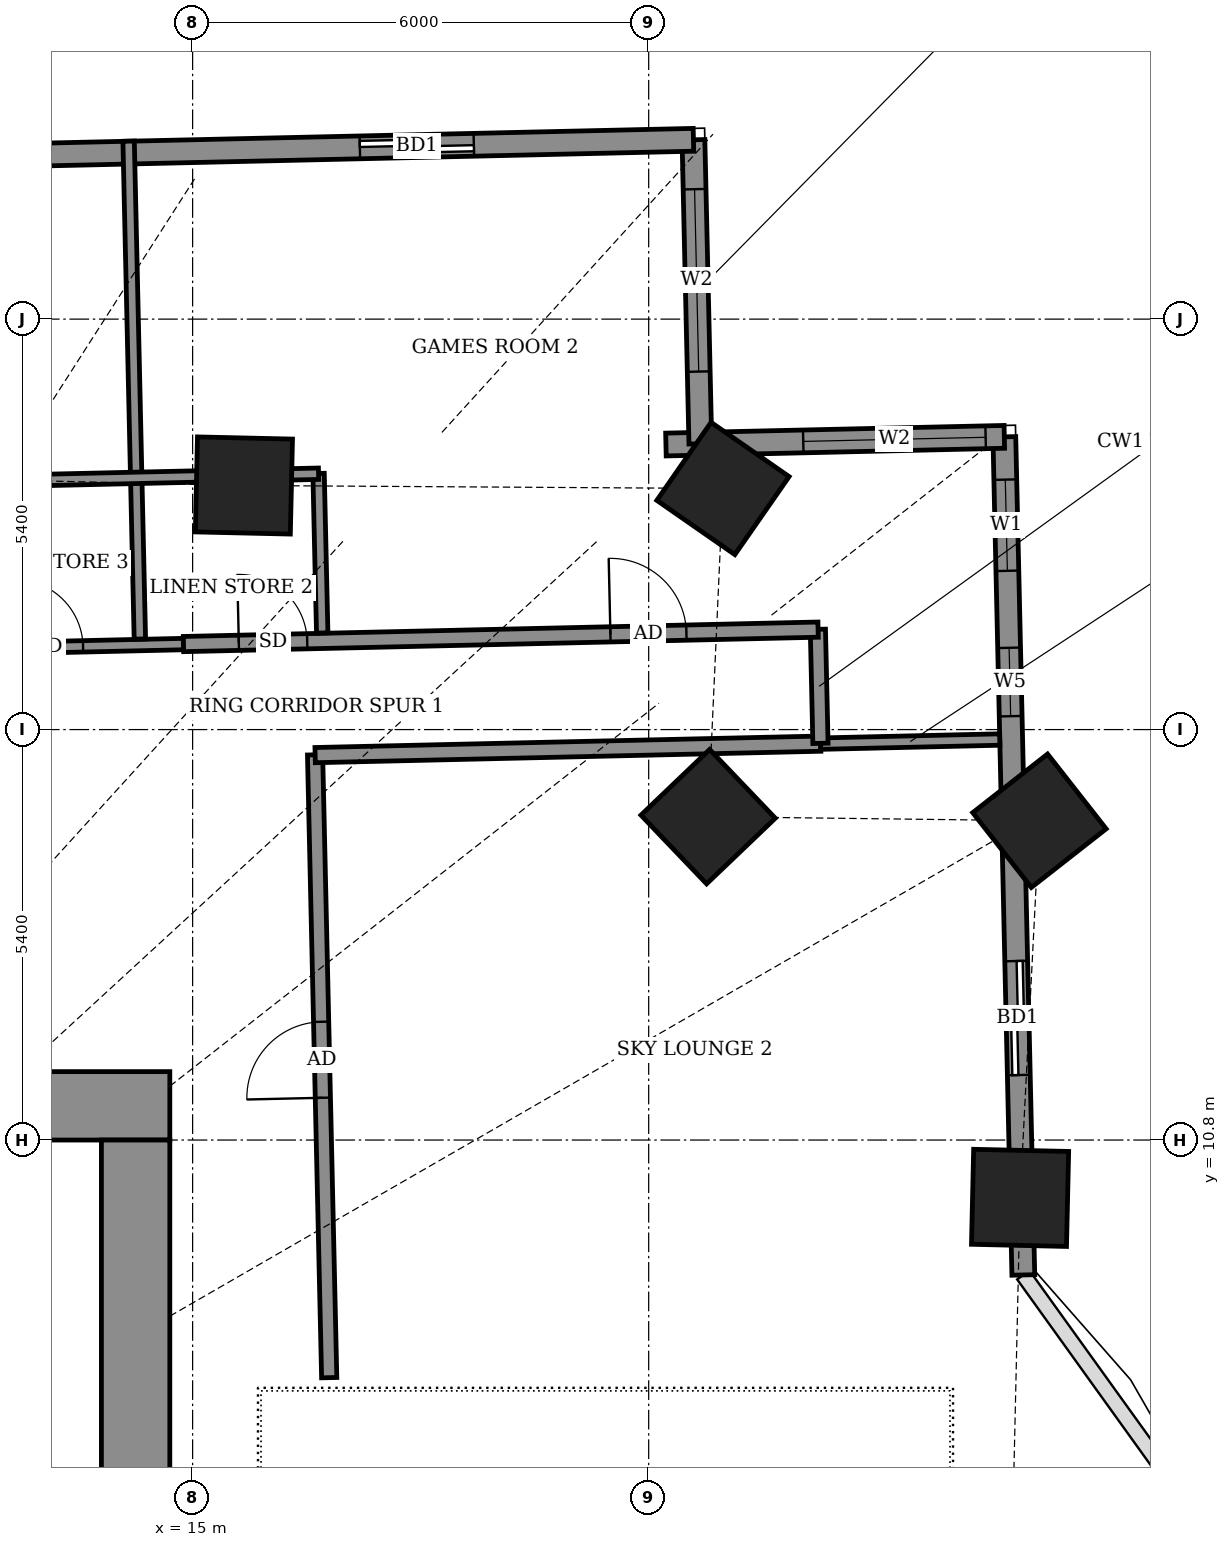
"""IFC4 building model, lengths in metres.
Left out: names, types, materials, properties, quantities, classifications, styles, units other than length and angle.
Written with IfcOpenShell. Run it as: python <this file> out.ifc"""

import sys

from ifc_helpers import new_model, si_unit, direction, frame, frame_2d, origin, origin_2d, place, context, subcontext, project, spatial, rectangle, extrude, element, fill, save


model = new_model("IFC4")
c1 = context("Model", 3, precision=1e-05, world=origin(), true_north=direction((0.0, 1.0)))
c2 = subcontext(c1, "Body", "Model", "MODEL_VIEW")
j1 = project(units=[si_unit("LENGTHUNIT", "METRE"), si_unit("PLANEANGLEUNIT", "RADIAN")], contexts=[c1])
p1 = place(None, origin())
s1 = spatial("IfcSite", under=j1, at=p1, CompositionType="ELEMENT")
p2 = place(p1, origin())
s2 = spatial("IfcBuilding", under=s1, at=p2, CompositionType="ELEMENT")
p3 = place(p2, frame((0.0, 0.0, 170.7)))
s3 = spatial("IfcBuildingStorey", under=s2, at=p3, CompositionType="ELEMENT", Elevation=170.7)
for number, where, z_axis, x_axis in (
    (1, (25.886, 10.039, -0.55), (0.0, 0.0, 1.0), (0.023, 1.0, 0.0)),
    (2, (26.141, 15.001, -0.55), (0.0, 0.0, 1.0), (-0.617, 0.787, 0.0)),
    (3, (21.782, 15.054, -0.55), (0.0, 0.0, 1.0), (-0.691, 0.723, 0.0)),
    (4, (21.977, 19.372, -0.55), (0.0, 0.0, 1.0), (-0.821, 0.571, 0.0)),
    (5, (15.675, 19.411, -0.55), (0.0, 0.0, 1.0), (-1.0, 0.023, 0.0)),
):
    element("IfcColumn", number, at=place(p3, frame(where, z_axis=z_axis, x_axis=x_axis)), inside=s3, PredefinedType="COLUMN", context=c2, shape_type="SweptSolid", body=[
        extrude(rectangle(XDim=1.25, YDim=1.25, at=origin_2d()), origin(), (0.0, 0.0, 1.0), 4.6),
    ])
p4 = place(p3, frame((25.929, 9.025, 0.0), z_axis=(0.0, 0.0, 1.0), x_axis=(-0.022667601583, 0.999743056909, 0.0)))
e6 = element("IfcWall", 6, at=p4, inside=s3, PredefinedType="SOLIDWALL", context=c2, shape_type="SweptSolid", body=[
    extrude(rectangle(XDim=11.029, YDim=0.3, at=frame_2d((5.515, 0.0))), origin(), (0.0, 0.0, 1.0), 2.65),
])
p5 = place(p4, frame((2.631, 0.0, 0.0)))
e7 = element("IfcOpeningElement", 7, at=p5, cuts=e6, PredefinedType="OPENING", context=c2, shape_type="SweptSolid", body=[
    extrude(rectangle(XDim=1.5, YDim=2.4, at=frame_2d((0.75, 1.2))), frame((0.0, 0.16, 0.0), z_axis=(0.0, -1.0, 0.0), x_axis=(1.0, 0.0, 0.0)), (0.0, 0.0, 1.0), 0.32),
])
p6 = place(p4, frame((7.353, 0.0, 0.9)))
e8 = element("IfcOpeningElement", 8, at=p6, cuts=e6, PredefinedType="OPENING", context=c2, shape_type="SweptSolid", body=[
    extrude(rectangle(XDim=0.9, YDim=1.5, at=frame_2d((0.45, 0.75))), frame((0.0, 0.16, 0.0), z_axis=(0.0, -1.0, 0.0), x_axis=(1.0, 0.0, 0.0)), (0.0, 0.0, 1.0), 0.32),
])
p7 = place(p4, frame((9.266, 0.0, 0.9)))
e9 = element("IfcOpeningElement", 9, at=p7, cuts=e6, PredefinedType="OPENING", context=c2, shape_type="SweptSolid", body=[
    extrude(rectangle(XDim=1.2, YDim=1.5, at=frame_2d((0.6, 0.75))), frame((0.0, 0.16, 0.0), z_axis=(0.0, -1.0, 0.0), x_axis=(1.0, 0.0, 0.0)), (0.0, 0.0, 1.0), 0.32),
])
p8 = place(p3, frame((25.679, 20.051, 0.0), z_axis=(0.0, 0.0, 1.0), x_axis=(-0.999742373047, -0.022697742936, 0.0)))
e10 = element("IfcWall", 10, at=p8, inside=s3, PredefinedType="SOLIDWALL", context=c2, shape_type="SweptSolid", body=[
    extrude(rectangle(XDim=4.453, YDim=0.3, at=frame_2d((2.227, 0.0))), origin(), (0.0, 0.0, 1.0), 2.85),
])
p9 = place(p8, frame((0.246, 0.0, 0.9)))
e11 = element("IfcOpeningElement", 11, at=p9, cuts=e10, PredefinedType="OPENING", context=c2, shape_type="SweptSolid", body=[
    extrude(rectangle(XDim=2.4, YDim=1.5, at=frame_2d((1.2, 0.75))), frame((0.0, 0.16, 0.0), z_axis=(0.0, -1.0, 0.0), x_axis=(1.0, 0.0, 0.0)), (0.0, 0.0, 1.0), 0.32),
])
p10 = place(p3, frame((21.68, 19.96, 0.0), z_axis=(0.0, 0.0, 1.0), x_axis=(-0.022704768219, 0.999742213523, 0.0)))
e12 = element("IfcWall", 12, at=p10, inside=s3, PredefinedType="SOLIDWALL", context=c2, shape_type="SweptSolid", body=[
    extrude(rectangle(XDim=4.0, YDim=0.3, at=frame_2d((2.0, 0.0))), origin(), (0.0, 0.0, 1.0), 2.85),
])
p11 = place(p10, frame((0.95, 0.0, 0.9)))
e13 = element("IfcOpeningElement", 13, at=p11, cuts=e12, PredefinedType="OPENING", context=c2, shape_type="SweptSolid", body=[
    extrude(rectangle(XDim=2.4, YDim=1.5, at=frame_2d((1.2, 0.75))), frame((0.0, 0.16, 0.0), z_axis=(0.0, -1.0, 0.0), x_axis=(1.0, 0.0, 0.0)), (0.0, 0.0, 1.0), 0.32),
])
p12 = place(p3, frame((21.589, 23.959, 0.0), z_axis=(0.0, 0.0, 1.0), x_axis=(-0.999742671382, -0.022684598702, 0.0)))
e14 = element("IfcWall", 14, at=p12, inside=s3, PredefinedType="SOLIDWALL", context=c2, shape_type="SweptSolid", body=[
    extrude(rectangle(XDim=40.381, YDim=0.3, at=frame_2d((20.19, 0.0))), origin(), (0.0, 0.0, 1.0), 2.85),
])
p13 = place(p12, frame((2.89, 0.0, 0.0)))
e15 = element("IfcOpeningElement", 15, at=p13, cuts=e14, PredefinedType="OPENING", context=c2, shape_type="SweptSolid", body=[
    extrude(rectangle(XDim=1.5, YDim=2.4, at=frame_2d((0.75, 1.2))), frame((0.0, 0.16, 0.0), z_axis=(0.0, -1.0, 0.0), x_axis=(1.0, 0.0, 0.0)), (0.0, 0.0, 1.0), 0.32),
])
p14 = place(p12, frame((10.48, 0.0, 0.9)))
e16 = element("IfcOpeningElement", 16, at=p14, cuts=e14, PredefinedType="OPENING", context=c2, shape_type="SweptSolid", body=[
    extrude(rectangle(XDim=2.4, YDim=1.5, at=frame_2d((1.2, 0.75))), frame((0.0, 0.16, 0.0), z_axis=(0.0, -1.0, 0.0), x_axis=(1.0, 0.0, 0.0)), (0.0, 0.0, 1.0), 0.32),
])
p15 = place(p12, frame((17.68, 0.0, 0.0)))
e17 = element("IfcOpeningElement", 17, at=p15, cuts=e14, PredefinedType="OPENING", context=c2, shape_type="SweptSolid", body=[
    extrude(rectangle(XDim=1.5, YDim=2.4, at=frame_2d((0.75, 1.2))), frame((0.0, 0.16, 0.0), z_axis=(0.0, -1.0, 0.0), x_axis=(1.0, 0.0, 0.0)), (0.0, 0.0, 1.0), 0.32),
])
p16 = place(p12, frame((22.705, 0.0, 0.0)))
e18 = element("IfcOpeningElement", 18, at=p16, cuts=e14, PredefinedType="OPENING", context=c2, shape_type="SweptSolid", body=[
    extrude(rectangle(XDim=1.5, YDim=2.4, at=frame_2d((0.75, 1.2))), frame((0.0, 0.16, 0.0), z_axis=(0.0, -1.0, 0.0), x_axis=(1.0, 0.0, 0.0)), (0.0, 0.0, 1.0), 0.32),
])
p17 = place(p12, frame((29.005, 0.0, 0.9)))
e19 = element("IfcOpeningElement", 19, at=p17, cuts=e14, PredefinedType="OPENING", context=c2, shape_type="SweptSolid", body=[
    extrude(rectangle(XDim=2.4, YDim=1.5, at=frame_2d((1.2, 0.75))), frame((0.0, 0.16, 0.0), z_axis=(0.0, -1.0, 0.0), x_axis=(1.0, 0.0, 0.0)), (0.0, 0.0, 1.0), 0.32),
])
p18 = place(p12, frame((36.28, 0.0, 0.9)))
e20 = element("IfcOpeningElement", 20, at=p18, cuts=e14, PredefinedType="OPENING", context=c2, shape_type="SweptSolid", body=[
    extrude(rectangle(XDim=2.4, YDim=1.5, at=frame_2d((1.2, 0.75))), frame((0.0, 0.16, 0.0), z_axis=(0.0, -1.0, 0.0), x_axis=(1.0, 0.0, 0.0)), (0.0, 0.0, 1.0), 0.32),
])
p19 = place(p3, frame((16.797, 7.674, 0.0), z_axis=(0.0, 0.0, 1.0), x_axis=(-0.022698399288, 0.999742358145, 0.0)))
e21 = element("IfcWall", 21, at=p19, inside=s3, PredefinedType="PARTITIONING", context=c2, shape_type="SweptSolid", body=[
    extrude(rectangle(XDim=8.196, YDim=0.2, at=frame_2d((4.098, 0.0))), origin(), (0.0, 0.0, 1.0), 2.65),
])
p20 = place(p19, frame((3.683, 0.0, 0.0)))
e22 = element("IfcOpeningElement", 22, at=p20, cuts=e21, PredefinedType="OPENING", context=c2, shape_type="SweptSolid", body=[
    extrude(rectangle(XDim=1.0, YDim=2.1, at=frame_2d((0.5, 1.05))), frame((0.0, 0.11, 0.0), z_axis=(0.0, -1.0, 0.0), x_axis=(1.0, 0.0, 0.0)), (0.0, 0.0, 1.0), 0.22),
])
p21 = place(p3, frame((16.612, 15.864, 0.0), z_axis=(0.0, 0.0, 1.0), x_axis=(0.999742781981, 0.022679723929, 0.0)))
e23 = element("IfcWall", 23, at=p21, inside=s3, PredefinedType="PARTITIONING", context=c2, shape_type="SweptSolid", body=[
    extrude(rectangle(XDim=6.653, YDim=0.2, at=frame_2d((3.326, 0.0))), origin(), (0.0, 0.0, 1.0), 2.75),
])
p22 = place(p3, frame((23.263, 16.015, 0.0), z_axis=(0.0, 0.0, 1.0), x_axis=(0.999735485804, 0.02299909615, 0.0)))
e24 = element("IfcWall", 24, at=p22, inside=s3, PredefinedType="PARTITIONING", context=c2, shape_type="SweptSolid", body=[
    extrude(rectangle(XDim=2.357, YDim=0.15, at=frame_2d((1.178, 0.0))), origin(), (0.0, 0.0, 1.0), 4.05),
])
p23 = place(p3, frame((23.26, 16.019, 0.0), z_axis=(0.0, 0.0, 1.0), x_axis=(-0.022617910375, 0.999744182344, 0.0)))
e25 = element("IfcWall", 25, at=p23, inside=s3, PredefinedType="PARTITIONING", context=c2, shape_type="SweptSolid", body=[
    extrude(rectangle(XDim=1.5, YDim=0.2, at=frame_2d((0.75, 0.0))), origin(), (0.0, 0.0, 1.0), 2.85),
])
p24 = place(p3, frame((-15.346, 16.639, 0.0), z_axis=(0.0, 0.0, 1.0), x_axis=(0.999742506322, 0.022691871978, 0.0)))
e26 = element("IfcWall", 26, at=p24, inside=s3, PredefinedType="PARTITIONING", context=c2, shape_type="SweptSolid", body=[
    extrude(rectangle(XDim=30.233, YDim=0.15, at=frame_2d((15.116, 0.0))), origin(), (0.0, 0.0, 1.0), 2.85),
])
p25 = place(p24, frame((23.712, 0.0, 0.0)))
e27 = element("IfcOpeningElement", 27, at=p25, cuts=e26, PredefinedType="OPENING", context=c2, shape_type="SweptSolid", body=[
    extrude(rectangle(XDim=1.0, YDim=2.1, at=frame_2d((0.5, 1.05))), frame((0.0, 0.085, 0.0), z_axis=(0.0, -1.0, 0.0), x_axis=(1.0, 0.0, 0.0)), (0.0, 0.0, 1.0), 0.17),
])
p26 = place(p24, frame((28.012, 0.0, 0.0)))
e28 = element("IfcOpeningElement", 28, at=p26, cuts=e26, PredefinedType="OPENING", context=c2, shape_type="SweptSolid", body=[
    extrude(rectangle(XDim=0.9, YDim=2.1, at=frame_2d((0.45, 1.05))), frame((0.0, 0.085, 0.0), z_axis=(0.0, -1.0, 0.0), x_axis=(1.0, 0.0, 0.0)), (0.0, 0.0, 1.0), 0.17),
])
p27 = place(p24, frame((19.412, 0.0, 0.0)))
e29 = element("IfcOpeningElement", 29, at=p27, cuts=e26, PredefinedType="OPENING", context=c2, shape_type="SweptSolid", body=[
    extrude(rectangle(XDim=0.9, YDim=2.1, at=frame_2d((0.45, 1.05))), frame((0.0, 0.085, 0.0), z_axis=(0.0, -1.0, 0.0), x_axis=(1.0, 0.0, 0.0)), (0.0, 0.0, 1.0), 0.17),
])
p28 = place(p24, frame((11.987, 0.0, 0.0)))
e30 = element("IfcOpeningElement", 30, at=p28, cuts=e26, PredefinedType="OPENING", context=c2, shape_type="SweptSolid", body=[
    extrude(rectangle(XDim=0.9, YDim=2.1, at=frame_2d((0.45, 1.05))), frame((0.0, 0.085, 0.0), z_axis=(0.0, -1.0, 0.0), x_axis=(1.0, 0.0, 0.0)), (0.0, 0.0, 1.0), 0.17),
])
p29 = place(p24, frame((7.587, 0.0, 0.0)))
e31 = element("IfcOpeningElement", 31, at=p29, cuts=e26, PredefinedType="OPENING", context=c2, shape_type="SweptSolid", body=[
    extrude(rectangle(XDim=1.0, YDim=2.1, at=frame_2d((0.5, 1.05))), frame((0.0, 0.085, 0.0), z_axis=(0.0, -1.0, 0.0), x_axis=(1.0, 0.0, 0.0)), (0.0, 0.0, 1.0), 0.17),
])
p30 = place(p24, frame((3.412, 0.0, 0.0)))
e32 = element("IfcOpeningElement", 32, at=p30, cuts=e26, PredefinedType="OPENING", context=c2, shape_type="SweptSolid", body=[
    extrude(rectangle(XDim=0.9, YDim=2.1, at=frame_2d((0.45, 1.05))), frame((0.0, 0.085, 0.0), z_axis=(0.0, -1.0, 0.0), x_axis=(1.0, 0.0, 0.0)), (0.0, 0.0, 1.0), 0.17),
])
p31 = place(p24, frame((1.012, 0.0, 0.0)))
e33 = element("IfcOpeningElement", 33, at=p31, cuts=e26, PredefinedType="OPENING", context=c2, shape_type="SweptSolid", body=[
    extrude(rectangle(XDim=0.9, YDim=2.1, at=frame_2d((0.45, 1.05))), frame((0.0, 0.085, 0.0), z_axis=(0.0, -1.0, 0.0), x_axis=(1.0, 0.0, 0.0)), (0.0, 0.0, 1.0), 0.17),
])
p32 = place(p3, frame((14.88, 17.325, 0.0), z_axis=(0.0, 0.0, 1.0), x_axis=(0.99974132215, 0.022743983526, 0.0)))
e34 = element("IfcWall", 34, at=p32, inside=s3, PredefinedType="PARTITIONING", context=c2, shape_type="SweptSolid", body=[
    extrude(rectangle(XDim=8.351, YDim=0.2, at=frame_2d((4.176, 0.0))), origin(), (0.0, 0.0, 1.0), 2.75),
])
p33 = place(p32, frame((5.618, 0.0, 0.0)))
e35 = element("IfcOpeningElement", 35, at=p33, cuts=e34, PredefinedType="OPENING", context=c2, shape_type="SweptSolid", body=[
    extrude(rectangle(XDim=1.0, YDim=2.1, at=frame_2d((0.5, 1.05))), frame((0.0, 0.11, 0.0), z_axis=(0.0, -1.0, 0.0), x_axis=(1.0, 0.0, 0.0)), (0.0, 0.0, 1.0), 0.22),
])
p34 = place(p32, frame((0.728, 0.0, 0.0)))
e36 = element("IfcOpeningElement", 36, at=p34, cuts=e34, PredefinedType="OPENING", context=c2, shape_type="SweptSolid", body=[
    extrude(rectangle(XDim=0.9, YDim=2.1, at=frame_2d((0.45, 1.05))), frame((0.0, 0.11, 0.0), z_axis=(0.0, -1.0, 0.0), x_axis=(1.0, 0.0, 0.0)), (0.0, 0.0, 1.0), 0.22),
])
p35 = place(p3, frame((14.306, 17.391, 0.0), z_axis=(0.0, 0.0, 1.0), x_axis=(-0.022582580084, 0.999744981021, 0.0)))
e37 = element("IfcWall", 37, at=p35, inside=s3, PredefinedType="PARTITIONING", context=c2, shape_type="SweptSolid", body=[
    extrude(rectangle(XDim=6.552, YDim=0.15, at=frame_2d((3.276, 0.0))), origin(), (0.0, 0.0, 1.0), 2.75),
])
p36 = place(p3, frame((16.705, 17.471, 0.0), z_axis=(0.0, 0.0, 1.0), x_axis=(-0.022906293375, 0.999737616439, 0.0)))
e38 = element("IfcWall", 38, at=p36, inside=s3, PredefinedType="PARTITIONING", context=c2, shape_type="SweptSolid", body=[
    extrude(rectangle(XDim=2.1, YDim=0.15, at=frame_2d((1.05, 0.0))), origin(), (0.0, 0.0, 1.0), 2.75),
])
p37 = place(p3, frame((11.859, 19.457, 0.0), z_axis=(0.0, 0.0, 1.0), x_axis=(0.999742596585, 0.02268789488, 0.0)))
e39 = element("IfcWall", 39, at=p37, inside=s3, PredefinedType="PARTITIONING", context=c2, shape_type="SweptSolid", body=[
    extrude(rectangle(XDim=4.799, YDim=0.15, at=frame_2d((2.4, 0.0))), origin(), (0.0, 0.0, 1.0), 2.75),
])
p38 = place(p3, frame((-14.7, 11.25, 0.0), z_axis=(0.0, 0.0, 1.0), x_axis=(1.0, 0.0, 0.0)))
e40 = element("IfcWall", 40, at=p38, inside=s3, PredefinedType="SHEAR", context=c2, shape_type="SweptSolid", body=[
    extrude(rectangle(XDim=29.4, YDim=0.9, at=frame_2d((14.7, 0.0))), origin(), (0.0, 0.0, 1.0), 4.6),
])
p39 = place(p3, frame((14.25, -10.8, 0.0), z_axis=(0.0, 0.0, 1.0), x_axis=(0.0, 1.0, 0.0)))
e41 = element("IfcWall", 41, at=p39, inside=s3, PredefinedType="SHEAR", context=c2, shape_type="SweptSolid", body=[
    extrude(rectangle(XDim=21.6, YDim=0.9, at=frame_2d((10.8, 0.0))), origin(), (0.0, 0.0, 1.0), 4.6),
])
p40 = place(p39, frame((1.2, 0.0, 0.0)))
e42 = element("IfcOpeningElement", 42, at=p40, cuts=e41, PredefinedType="OPENING", context=c2, shape_type="SweptSolid", body=[
    extrude(rectangle(XDim=1.2, YDim=2.1, at=frame_2d((0.6, 1.05))), frame((0.0, 0.46, 0.0), z_axis=(0.0, -1.0, 0.0), x_axis=(1.0, 0.0, 0.0)), (0.0, 0.0, 1.0), 0.92),
])
p41 = place(p5, origin())
e43 = element("IfcDoor", 43, at=p41, inside=s3, OperationType="SLIDING_TO_LEFT", PredefinedType="DOOR", context=c2, shape_type="SweptSolid", body=[
    extrude(rectangle(XDim=1.5, YDim=2.4, at=frame_2d((0.75, 1.2))), frame((0.0, 0.025, 0.0), z_axis=(0.0, -1.0, 0.0), x_axis=(1.0, 0.0, 0.0)), (0.0, 0.0, 1.0), 0.05),
])
fill(e7, e43)
p42 = place(p6, origin())
e44 = element("IfcWindow", 44, at=p42, inside=s3, PartitioningType="SINGLE_PANEL", PredefinedType="WINDOW", context=c2, shape_type="SweptSolid", body=[
    extrude(rectangle(XDim=0.9, YDim=1.5, at=frame_2d((0.45, 0.75))), frame((0.0, 0.03, 0.0), z_axis=(0.0, -1.0, 0.0), x_axis=(1.0, 0.0, 0.0)), (0.0, 0.0, 1.0), 0.06),
])
fill(e8, e44)
p43 = place(p7, origin())
e45 = element("IfcWindow", 45, at=p43, inside=s3, PartitioningType="SINGLE_PANEL", PredefinedType="WINDOW", context=c2, shape_type="SweptSolid", body=[
    extrude(rectangle(XDim=1.2, YDim=1.5, at=frame_2d((0.6, 0.75))), frame((0.0, 0.03, 0.0), z_axis=(0.0, -1.0, 0.0), x_axis=(1.0, 0.0, 0.0)), (0.0, 0.0, 1.0), 0.06),
])
fill(e9, e45)
p44 = place(p9, origin())
e46 = element("IfcWindow", 46, at=p44, inside=s3, PartitioningType="DOUBLE_PANEL_VERTICAL", PredefinedType="WINDOW", context=c2, shape_type="SweptSolid", body=[
    extrude(rectangle(XDim=2.4, YDim=1.5, at=frame_2d((1.2, 0.75))), frame((0.0, 0.03, 0.0), z_axis=(0.0, -1.0, 0.0), x_axis=(1.0, 0.0, 0.0)), (0.0, 0.0, 1.0), 0.06),
])
fill(e11, e46)
p45 = place(p11, origin())
e47 = element("IfcWindow", 47, at=p45, inside=s3, PartitioningType="DOUBLE_PANEL_VERTICAL", PredefinedType="WINDOW", context=c2, shape_type="SweptSolid", body=[
    extrude(rectangle(XDim=2.4, YDim=1.5, at=frame_2d((1.2, 0.75))), frame((0.0, 0.03, 0.0), z_axis=(0.0, -1.0, 0.0), x_axis=(1.0, 0.0, 0.0)), (0.0, 0.0, 1.0), 0.06),
])
fill(e13, e47)
p46 = place(p13, origin())
e48 = element("IfcDoor", 48, at=p46, inside=s3, OperationType="SLIDING_TO_LEFT", PredefinedType="DOOR", context=c2, shape_type="SweptSolid", body=[
    extrude(rectangle(XDim=1.5, YDim=2.4, at=frame_2d((0.75, 1.2))), frame((0.0, 0.025, 0.0), z_axis=(0.0, -1.0, 0.0), x_axis=(1.0, 0.0, 0.0)), (0.0, 0.0, 1.0), 0.05),
])
fill(e15, e48)
p47 = place(p20, origin())
e49 = element("IfcDoor", 49, at=p47, inside=s3, OperationType="SINGLE_SWING_LEFT", PredefinedType="DOOR", context=c2, shape_type="SweptSolid", body=[
    extrude(rectangle(XDim=1.0, YDim=2.1, at=frame_2d((0.5, 1.05))), frame((0.0, 0.025, 0.0), z_axis=(0.0, -1.0, 0.0), x_axis=(1.0, 0.0, 0.0)), (0.0, 0.0, 1.0), 0.05),
])
fill(e22, e49)
p48 = place(p33, origin())
e50 = element("IfcDoor", 50, at=p48, inside=s3, OperationType="SINGLE_SWING_RIGHT", PredefinedType="DOOR", context=c2, shape_type="SweptSolid", body=[
    extrude(rectangle(XDim=1.0, YDim=2.1, at=frame_2d((0.5, 1.05))), frame((0.0, 0.025, 0.0), z_axis=(0.0, -1.0, 0.0), x_axis=(1.0, 0.0, 0.0)), (0.0, 0.0, 1.0), 0.05),
])
fill(e35, e50)
p49 = place(p34, origin())
e51 = element("IfcDoor", 51, at=p49, inside=s3, OperationType="SINGLE_SWING_RIGHT", PredefinedType="DOOR", context=c2, shape_type="SweptSolid", body=[
    extrude(rectangle(XDim=0.9, YDim=2.1, at=frame_2d((0.45, 1.05))), frame((0.0, 0.025, 0.0), z_axis=(0.0, -1.0, 0.0), x_axis=(1.0, 0.0, 0.0)), (0.0, 0.0, 1.0), 0.05),
])
fill(e36, e51)
p50 = place(p26, origin())
e52 = element("IfcDoor", 52, at=p50, inside=s3, OperationType="SINGLE_SWING_LEFT", PredefinedType="DOOR", context=c2, shape_type="SweptSolid", body=[
    extrude(rectangle(XDim=0.9, YDim=2.1, at=frame_2d((0.45, 1.05))), frame((0.0, 0.025, 0.0), z_axis=(0.0, -1.0, 0.0), x_axis=(1.0, 0.0, 0.0)), (0.0, 0.0, 1.0), 0.05),
])
fill(e28, e52)
save(model, sys.argv[1])
